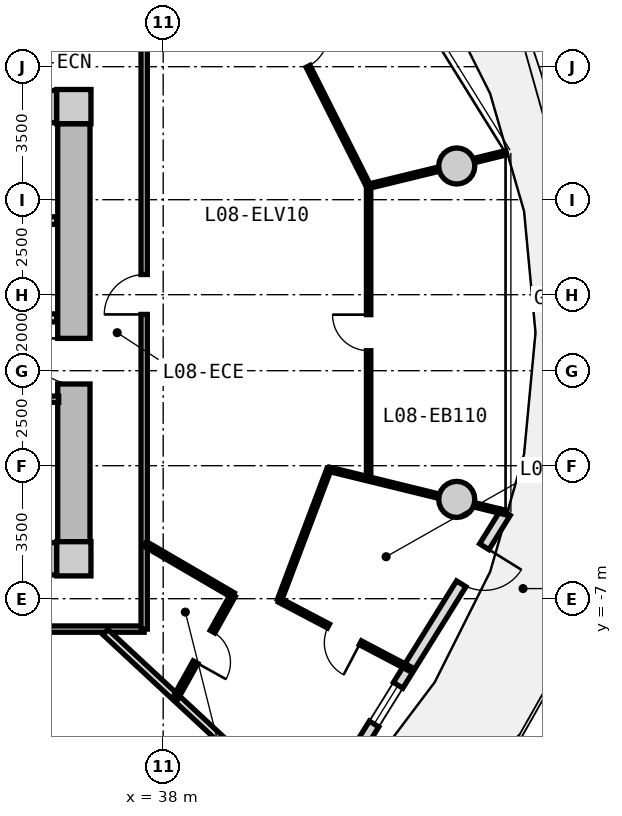
"""IFC4 building model, lengths in metres.
Left out: names, types, materials, properties, quantities, classifications, styles, units other than length and angle.
Written with IfcOpenShell. Run it as: python <this file> out.ifc"""

import sys

from ifc_helpers import new_model, si_unit, direction, frame, frame_2d, origin, origin_2d, place, context, subcontext, project, spatial, rectangle, circle, extrude, source, transform, mapped, element, fill, save


model = new_model("IFC4")
c1 = context("Model", 3, precision=1e-05, world=origin(), true_north=direction((0.0, 1.0)))
c2 = subcontext(c1, "Body", "Model", "MODEL_VIEW")
j1 = project(units=[si_unit("LENGTHUNIT", "METRE"), si_unit("PLANEANGLEUNIT", "RADIAN")], contexts=[c1])
p1 = place(None, origin())
s1 = spatial("IfcSite", under=j1, at=p1, CompositionType="ELEMENT")
p2 = place(p1, origin())
s2 = spatial("IfcBuilding", under=s1, at=p2, CompositionType="ELEMENT")
p3 = place(p2, frame((0.0, 0.0, 30.75)))
s3 = spatial("IfcBuildingStorey", under=s2, at=p3, CompositionType="ELEMENT", Elevation=30.75)
m1 = source(origin(), c2, "Body", "SweptSolid", [
    extrude(rectangle(XDim=0.9, YDim=0.9, at=origin_2d()), origin(), (0.0, 0.0, 1.0), 3.05),
])
for number, where, z_axis, x_axis in (
    (1, (35.65, -5.95, 0.0), (0.0, 0.0, 1.0), (1.0, 0.0, 0.0)),
    (2, (35.65, 5.95, 0.0), (0.0, 0.0, 1.0), (1.0, 0.0, 0.0)),
):
    element("IfcColumn", number, at=place(p3, frame(where, z_axis=z_axis, x_axis=x_axis)), inside=s3, PredefinedType="COLUMN", context=c2, shape_type="MappedRepresentation", body=[
        mapped(m1, transform((0.0, 0.0, 0.0), x_axis=(1.0, 0.0, 0.0), y_axis=(0.0, 1.0, 0.0), z_axis=(0.0, 0.0, 1.0), scale=1.0)),
    ])
m2 = source(origin(), c2, "Body", "SweptSolid", [
    extrude(rectangle(XDim=14.4, YDim=0.85, at=frame_2d((7.2, 0.0))), origin(), (0.0, 0.0, 1.0), 2.79),
])
for number, where, z_axis, x_axis in (
    (3, (20.8, 5.95, 0.0), (0.0, 0.0, 1.0), (1.0, 0.0, 0.0)),
    (4, (35.2, -5.95, 0.0), (0.0, 0.0, 1.0), (-1.0, 0.0, 0.0)),
):
    element("IfcWall", number, at=place(p3, frame(where, z_axis=z_axis, x_axis=x_axis)), inside=s3, PredefinedType="SHEAR", context=c2, shape_type="MappedRepresentation", body=[
        mapped(m2, transform((0.0, 0.0, 0.0), x_axis=(1.0, 0.0, 0.0), y_axis=(0.0, 1.0, 0.0), z_axis=(0.0, 0.0, 1.0), scale=1.0)),
    ])
m3 = source(origin(), c2, "Body", "SweptSolid", [
    extrude(rectangle(XDim=11.0, YDim=0.85, at=frame_2d((5.5, 0.0))), origin(), (0.0, 0.0, 1.0), 2.79),
])
p4 = place(p3, frame((35.65, 5.5, 0.0), z_axis=(0.0, 0.0, 1.0), x_axis=(0.0, -1.0, 0.0)))
e5 = element("IfcWall", 5, at=p4, inside=s3, PredefinedType="SHEAR", context=c2, shape_type="MappedRepresentation", body=[
    mapped(m3, transform((0.0, 0.0, 0.0), x_axis=(1.0, 0.0, 0.0), y_axis=(0.0, 1.0, 0.0), z_axis=(0.0, 0.0, 1.0), scale=1.0)),
])
p5 = place(p4, frame((5.65, 0.0, 0.0)))
e6 = element("IfcOpeningElement", 6, at=p5, cuts=e5, PredefinedType="OPENING", context=c2, shape_type="SweptSolid", body=[
    extrude(rectangle(XDim=1.2, YDim=2.15, at=frame_2d((0.6, 1.075))), frame((0.0, 0.435, 0.0), z_axis=(0.0, -1.0, 0.0), x_axis=(1.0, 0.0, 0.0)), (0.0, 0.0, 1.0), 0.87),
])
m4 = source(origin(), c2, "Body", "SweptSolid", [
    extrude(circle(Radius=0.475, at=origin_2d()), origin(), (0.0, 0.0, 1.0), 3.05),
])
for number, where, z_axis, x_axis in (
    (7, (45.725, 4.387, 0.0), (0.0, 0.0, 1.0), (1.0, 0.0, 0.0)),
    (8, (45.725, -4.387, 0.0), (0.0, 0.0, 1.0), (1.0, 0.0, 0.0)),
):
    element("IfcColumn", number, at=place(p3, frame(where, z_axis=z_axis, x_axis=x_axis)), inside=s3, PredefinedType="COLUMN", context=c2, shape_type="MappedRepresentation", body=[
        mapped(m4, transform((0.0, 0.0, 0.0), x_axis=(1.0, 0.0, 0.0), y_axis=(0.0, 1.0, 0.0), z_axis=(0.0, 0.0, 1.0), scale=1.0)),
    ])
m5 = source(origin(), c2, "Body", "SweptSolid", [
    extrude(rectangle(XDim=9.649, YDim=0.29, at=frame_2d((4.824, 0.0))), origin(), (0.0, 0.0, 1.0), 2.79),
])
p6 = place(p3, frame((47.01, -4.731, 0.0), z_axis=(0.0, 0.0, 1.0), x_axis=(-0.527909458386, -0.849300655684, 0.0)))
e9 = element("IfcWall", 9, at=p6, inside=s3, PredefinedType="SOLIDWALL", context=c2, shape_type="MappedRepresentation", body=[
    mapped(m5, transform((0.0, 0.0, 0.0), x_axis=(1.0, 0.0, 0.0), y_axis=(0.0, 1.0, 0.0), z_axis=(0.0, 0.0, 1.0), scale=1.0)),
])
p7 = place(p6, frame((1.06, 0.0, 0.0)))
e10 = element("IfcOpeningElement", 10, at=p7, cuts=e9, PredefinedType="OPENING", context=c2, shape_type="SweptSolid", body=[
    extrude(rectangle(XDim=1.15, YDim=2.25, at=frame_2d((0.575, 1.125))), frame((0.0, 0.155, 0.0), z_axis=(0.0, -1.0, 0.0), x_axis=(1.0, 0.0, 0.0)), (0.0, 0.0, 1.0), 0.31),
])
p8 = place(p6, frame((5.354, 0.0, 0.85)))
e11 = element("IfcOpeningElement", 11, at=p8, cuts=e9, PredefinedType="OPENING", context=c2, shape_type="SweptSolid", body=[
    extrude(rectangle(XDim=1.2, YDim=1.5, at=frame_2d((0.6, 0.75))), frame((0.0, 0.155, 0.0), z_axis=(0.0, -1.0, 0.0), x_axis=(1.0, 0.0, 0.0)), (0.0, 0.0, 1.0), 0.31),
])
m6 = source(origin(), c2, "Body", "SweptSolid", [
    extrude(rectangle(XDim=3.2, YDim=0.2, at=frame_2d((1.6, 0.0))), origin(), (0.0, 0.0, 1.0), 2.775),
])
p9 = place(p3, frame((32.0, 2.95, 0.0), z_axis=(0.0, 0.0, 1.0), x_axis=(1.0, 0.0, 0.0)))
e12 = element("IfcWall", 12, at=p9, inside=s3, PredefinedType="PARTITIONING", context=c2, shape_type="MappedRepresentation", body=[
    mapped(m6, transform((0.0, 0.0, 0.0), x_axis=(1.0, 0.0, 0.0), y_axis=(0.0, 1.0, 0.0), z_axis=(0.0, 0.0, 1.0), scale=1.0)),
])
m7 = source(origin(), c2, "Body", "SweptSolid", [
    extrude(rectangle(XDim=6.66, YDim=0.21, at=frame_2d((3.33, 0.0))), origin(), (0.0, 0.0, 1.0), 2.775),
])
p10 = place(p3, frame((28.54, 0.39, 0.0), z_axis=(0.0, 0.0, 1.0), x_axis=(1.0, 0.0, 0.0)))
e13 = element("IfcWall", 13, at=p10, inside=s3, PredefinedType="PARTITIONING", context=c2, shape_type="MappedRepresentation", body=[
    mapped(m7, transform((0.0, 0.0, 0.0), x_axis=(1.0, 0.0, 0.0), y_axis=(0.0, 1.0, 0.0), z_axis=(0.0, 0.0, 1.0), scale=1.0)),
])
p11 = place(p10, frame((1.0, 0.0, 0.0)))
e14 = element("IfcOpeningElement", 14, at=p11, cuts=e13, PredefinedType="OPENING", context=c2, shape_type="SweptSolid", body=[
    extrude(rectangle(XDim=1.2, YDim=2.15, at=frame_2d((0.6, 1.075))), frame((0.0, 0.115, 0.0), z_axis=(0.0, -1.0, 0.0), x_axis=(1.0, 0.0, 0.0)), (0.0, 0.0, 1.0), 0.23),
])
m8 = source(origin(), c2, "Body", "SweptSolid", [
    extrude(rectangle(XDim=2.7, YDim=0.165, at=frame_2d((1.35, 0.0))), origin(), (0.0, 0.0, 1.0), 2.775),
])
p12 = place(p3, frame((32.55, -1.75, 0.0), z_axis=(0.0, 0.0, 1.0), x_axis=(1.0, 0.0, 0.0)))
e15 = element("IfcWall", 15, at=p12, inside=s3, PredefinedType="PARTITIONING", context=c2, shape_type="MappedRepresentation", body=[
    mapped(m8, transform((0.0, 0.0, 0.0), x_axis=(1.0, 0.0, 0.0), y_axis=(0.0, 1.0, 0.0), z_axis=(0.0, 0.0, 1.0), scale=1.0)),
])
p13 = place(p12, frame((0.222, 0.0, 0.0)))
e16 = element("IfcOpeningElement", 16, at=p13, cuts=e15, PredefinedType="OPENING", context=c2, shape_type="SweptSolid", body=[
    extrude(rectangle(XDim=0.925, YDim=2.1, at=frame_2d((0.462, 1.05))), frame((0.0, 0.093, 0.0), z_axis=(0.0, -1.0, 0.0), x_axis=(1.0, 0.0, 0.0)), (0.0, 0.0, 1.0), 0.185),
])
p14 = place(p12, frame((1.522, 0.0, 0.0)))
e17 = element("IfcOpeningElement", 17, at=p14, cuts=e15, PredefinedType="OPENING", context=c2, shape_type="SweptSolid", body=[
    extrude(rectangle(XDim=0.925, YDim=2.1, at=frame_2d((0.462, 1.05))), frame((0.0, 0.093, 0.0), z_axis=(0.0, -1.0, 0.0), x_axis=(1.0, 0.0, 0.0)), (0.0, 0.0, 1.0), 0.185),
])
m9 = source(origin(), c2, "Body", "SweptSolid", [
    extrude(rectangle(XDim=19.0, YDim=0.165, at=frame_2d((9.5, 0.0))), origin(), (0.0, 0.0, 1.0), 2.775),
])
p15 = place(p3, frame((37.5, -7.8, 0.0), z_axis=(0.0, 0.0, 1.0), x_axis=(-1.0, 0.0, 0.0)))
e18 = element("IfcWall", 18, at=p15, inside=s3, PredefinedType="PARTITIONING", context=c2, shape_type="MappedRepresentation", body=[
    mapped(m9, transform((0.0, 0.0, 0.0), x_axis=(1.0, 0.0, 0.0), y_axis=(0.0, 1.0, 0.0), z_axis=(0.0, 0.0, 1.0), scale=1.0)),
])
p16 = place(p15, frame((7.336, 0.0, 0.0)))
e19 = element("IfcOpeningElement", 19, at=p16, cuts=e18, PredefinedType="OPENING", context=c2, shape_type="SweptSolid", body=[
    extrude(rectangle(XDim=1.05, YDim=2.15, at=frame_2d((0.525, 1.075))), frame((0.0, 0.093, 0.0), z_axis=(0.0, -1.0, 0.0), x_axis=(1.0, 0.0, 0.0)), (0.0, 0.0, 1.0), 0.185),
])
m10 = source(origin(), c2, "Body", "SweptSolid", [
    extrude(rectangle(XDim=15.6, YDim=0.165, at=frame_2d((7.8, 0.0))), origin(), (0.0, 0.0, 1.0), 2.775),
])
p17 = place(p3, frame((37.5, 7.8, 0.0), z_axis=(0.0, 0.0, 1.0), x_axis=(0.0, -1.0, 0.0)))
e20 = element("IfcWall", 20, at=p17, inside=s3, PredefinedType="PARTITIONING", context=c2, shape_type="MappedRepresentation", body=[
    mapped(m10, transform((0.0, 0.0, 0.0), x_axis=(1.0, 0.0, 0.0), y_axis=(0.0, 1.0, 0.0), z_axis=(0.0, 0.0, 1.0), scale=1.0)),
])
p18 = place(p17, frame((6.269, 0.0, 0.0)))
e21 = element("IfcOpeningElement", 21, at=p18, cuts=e20, PredefinedType="OPENING", context=c2, shape_type="SweptSolid", body=[
    extrude(rectangle(XDim=1.05, YDim=2.15, at=frame_2d((0.525, 1.075))), frame((0.0, 0.093, 0.0), z_axis=(0.0, -1.0, 0.0), x_axis=(1.0, 0.0, 0.0)), (0.0, 0.0, 1.0), 0.185),
])
m11 = source(origin(), c2, "Body", "SweptSolid", [
    extrude(rectangle(XDim=7.435, YDim=0.19, at=frame_2d((3.717, 0.0))), origin(), (0.0, 0.0, 1.0), 2.415),
])
p19 = place(p3, frame((36.483, -7.88, 0.0), z_axis=(0.0, 0.0, 1.0), x_axis=(0.732651956848, -0.680603489652, 0.0)))
e22 = element("IfcWall", 22, at=p19, inside=s3, PredefinedType="PARTITIONING", context=c2, shape_type="MappedRepresentation", body=[
    mapped(m11, transform((0.0, 0.0, 0.0), x_axis=(1.0, 0.0, 0.0), y_axis=(0.0, 1.0, 0.0), z_axis=(0.0, 0.0, 1.0), scale=1.0)),
])
m12 = source(origin(), c2, "Body", "SweptSolid", [
    extrude(rectangle(XDim=7.709, YDim=0.115, at=frame_2d((3.855, 0.0))), origin(), (0.0, 0.0, 1.0), 2.775),
])
p20 = place(p3, frame((43.406, -3.855, 0.0), z_axis=(0.0, 0.0, 1.0), x_axis=(0.0, 1.0, 0.0)))
e23 = element("IfcWall", 23, at=p20, inside=s3, PredefinedType="PARTITIONING", context=c2, shape_type="MappedRepresentation", body=[
    mapped(m12, transform((0.0, 0.0, 0.0), x_axis=(1.0, 0.0, 0.0), y_axis=(0.0, 1.0, 0.0), z_axis=(0.0, 0.0, 1.0), scale=1.0)),
])
p21 = place(p20, frame((3.38, 0.0, 0.0)))
e24 = element("IfcOpeningElement", 24, at=p21, cuts=e23, PredefinedType="OPENING", context=c2, shape_type="SweptSolid", body=[
    extrude(rectangle(XDim=0.95, YDim=2.1, at=frame_2d((0.475, 1.05))), frame((0.0, 0.067, 0.0), z_axis=(0.0, -1.0, 0.0), x_axis=(1.0, 0.0, 0.0)), (0.0, 0.0, 1.0), 0.135),
])
m13 = source(origin(), c2, "Body", "SweptSolid", [
    extrude(rectangle(XDim=4.803, YDim=0.115, at=frame_2d((2.401, 0.0))), origin(), (0.0, 0.0, 1.0), 2.225),
])
p22 = place(p3, frame((42.364, -3.594, 0.0), z_axis=(0.0, 0.0, 1.0), x_axis=(0.97129155908, -0.237892217736, 0.0)))
e25 = element("IfcWall", 25, at=p22, inside=s3, PredefinedType="PARTITIONING", context=c2, shape_type="MappedRepresentation", body=[
    mapped(m13, transform((0.0, 0.0, 0.0), x_axis=(1.0, 0.0, 0.0), y_axis=(0.0, 1.0, 0.0), z_axis=(0.0, 0.0, 1.0), scale=1.0)),
])
m14 = source(origin(), c2, "Body", "SweptSolid", [
    extrude(rectangle(XDim=8.018, YDim=0.115, at=frame_2d((4.009, 0.0))), origin(), (0.0, 0.0, 1.0), 2.775),
])
p23 = place(p3, frame((43.404, 3.854, 0.0), z_axis=(0.0, 0.0, 1.0), x_axis=(-0.450134355233, 0.89296084026, 0.0)))
e26 = element("IfcWall", 26, at=p23, inside=s3, PredefinedType="PARTITIONING", context=c2, shape_type="MappedRepresentation", body=[
    mapped(m14, transform((0.0, 0.0, 0.0), x_axis=(1.0, 0.0, 0.0), y_axis=(0.0, 1.0, 0.0), z_axis=(0.0, 0.0, 1.0), scale=1.0)),
])
p24 = place(p23, frame((3.534, 0.0, 0.0)))
e27 = element("IfcOpeningElement", 27, at=p24, cuts=e26, PredefinedType="OPENING", context=c2, shape_type="SweptSolid", body=[
    extrude(rectangle(XDim=0.95, YDim=2.1, at=frame_2d((0.475, 1.05))), frame((0.0, 0.067, 0.0), z_axis=(0.0, -1.0, 0.0), x_axis=(1.0, 0.0, 0.0)), (0.0, 0.0, 1.0), 0.135),
])
m15 = source(origin(), c2, "Body", "SweptSolid", [
    extrude(rectangle(XDim=3.73, YDim=0.115, at=frame_2d((1.865, 0.0))), origin(), (0.0, 0.0, 1.0), 2.225),
])
p25 = place(p3, frame((43.404, 3.854, 0.0), z_axis=(0.0, 0.0, 1.0), x_axis=(0.971644038568, 0.236448434791, 0.0)))
e28 = element("IfcWall", 28, at=p25, inside=s3, PredefinedType="PARTITIONING", context=c2, shape_type="MappedRepresentation", body=[
    mapped(m15, transform((0.0, 0.0, 0.0), x_axis=(1.0, 0.0, 0.0), y_axis=(0.0, 1.0, 0.0), z_axis=(0.0, 0.0, 1.0), scale=1.0)),
])
m16 = source(origin(), c2, "Body", "SweptSolid", [
    extrude(rectangle(XDim=2.669, YDim=0.14, at=frame_2d((1.335, 0.0))), origin(), (0.0, 0.0, 1.0), 2.775),
])
p26 = place(p3, frame((37.53, -5.561, 0.0), z_axis=(0.0, 0.0, 1.0), x_axis=(0.86369928178, -0.50400749067, 0.0)))
e29 = element("IfcWall", 29, at=p26, inside=s3, PredefinedType="PARTITIONING", context=c2, shape_type="MappedRepresentation", body=[
    mapped(m16, transform((0.0, 0.0, 0.0), x_axis=(1.0, 0.0, 0.0), y_axis=(0.0, 1.0, 0.0), z_axis=(0.0, 0.0, 1.0), scale=1.0)),
])
m17 = source(origin(), c2, "Body", "SweptSolid", [
    extrude(rectangle(XDim=3.121, YDim=0.14, at=frame_2d((1.561, 0.0))), origin(), (0.0, 0.0, 1.0), 2.775),
])
p27 = place(p3, frame((39.836, -6.906, 0.0), z_axis=(0.0, 0.0, 1.0), x_axis=(-0.487302357327, -0.873233309342, 0.0)))
e30 = element("IfcWall", 30, at=p27, inside=s3, PredefinedType="PARTITIONING", context=c2, shape_type="MappedRepresentation", body=[
    mapped(m17, transform((0.0, 0.0, 0.0), x_axis=(1.0, 0.0, 0.0), y_axis=(0.0, 1.0, 0.0), z_axis=(0.0, 0.0, 1.0), scale=1.0)),
])
p28 = place(p27, frame((1.101, 0.0, 0.0)))
e31 = element("IfcOpeningElement", 31, at=p28, cuts=e30, PredefinedType="OPENING", context=c2, shape_type="SweptSolid", body=[
    extrude(rectangle(XDim=0.92, YDim=2.1, at=frame_2d((0.46, 1.05))), frame((0.0, 0.08, 0.0), z_axis=(0.0, -1.0, 0.0), x_axis=(1.0, 0.0, 0.0)), (0.0, 0.0, 1.0), 0.16),
])
m18 = source(origin(), c2, "Body", "SweptSolid", [
    extrude(rectangle(XDim=3.864, YDim=0.115, at=frame_2d((1.932, 0.0))), origin(), (0.0, 0.0, 1.0), 2.775),
])
p29 = place(p3, frame((41.06, -7.041, 0.0), z_axis=(0.0, 0.0, 1.0), x_axis=(0.885194959803, -0.465220252289, 0.0)))
e32 = element("IfcWall", 32, at=p29, inside=s3, PredefinedType="PARTITIONING", context=c2, shape_type="MappedRepresentation", body=[
    mapped(m18, transform((0.0, 0.0, 0.0), x_axis=(1.0, 0.0, 0.0), y_axis=(0.0, 1.0, 0.0), z_axis=(0.0, 0.0, 1.0), scale=1.0)),
])
p30 = place(p29, frame((1.457, 0.0, 0.0)))
e33 = element("IfcOpeningElement", 33, at=p30, cuts=e32, PredefinedType="OPENING", context=c2, shape_type="SweptSolid", body=[
    extrude(rectangle(XDim=0.95, YDim=2.1, at=frame_2d((0.475, 1.05))), frame((0.0, 0.067, 0.0), z_axis=(0.0, -1.0, 0.0), x_axis=(1.0, 0.0, 0.0)), (0.0, 0.0, 1.0), 0.135),
])
m19 = source(origin(), c2, "Body", "SweptSolid", [
    extrude(rectangle(XDim=3.685, YDim=0.115, at=frame_2d((1.843, 0.0))), origin(), (0.0, 0.0, 1.0), 2.775),
])
p31 = place(p3, frame((41.06, -7.041, 0.0), z_axis=(0.0, 0.0, 1.0), x_axis=(0.353503632997, 0.935433151785, 0.0)))
e34 = element("IfcWall", 34, at=p31, inside=s3, PredefinedType="PARTITIONING", context=c2, shape_type="MappedRepresentation", body=[
    mapped(m19, transform((0.0, 0.0, 0.0), x_axis=(1.0, 0.0, 0.0), y_axis=(0.0, 1.0, 0.0), z_axis=(0.0, 0.0, 1.0), scale=1.0)),
])
m20 = source(origin(), c2, "Body", "SweptSolid", [
    extrude(rectangle(XDim=1.15, YDim=2.25, at=frame_2d((0.575, 1.125))), frame((0.0, 0.025, 0.0), z_axis=(0.0, -1.0, 0.0), x_axis=(1.0, 0.0, 0.0)), (0.0, 0.0, 1.0), 0.05),
])
p32 = place(p7, origin())
e35 = element("IfcDoor", 35, at=p32, inside=s3, OperationType="SINGLE_SWING_LEFT", PredefinedType="DOOR", context=c2, shape_type="MappedRepresentation", body=[
    mapped(m20, transform((0.0, 0.0, 0.0), x_axis=(1.0, 0.0, 0.0), y_axis=(0.0, 1.0, 0.0), z_axis=(0.0, 0.0, 1.0), scale=1.0)),
])
fill(e10, e35)
m21 = source(origin(), c2, "Body", "SweptSolid", [
    extrude(rectangle(XDim=1.2, YDim=1.5, at=frame_2d((0.6, 0.75))), frame((0.0, 0.03, 0.0), z_axis=(0.0, -1.0, 0.0), x_axis=(1.0, 0.0, 0.0)), (0.0, 0.0, 1.0), 0.06),
])
p33 = place(p8, origin())
e36 = element("IfcWindow", 36, at=p33, inside=s3, PartitioningType="SINGLE_PANEL", PredefinedType="WINDOW", context=c2, shape_type="MappedRepresentation", body=[
    mapped(m21, transform((0.0, 0.0, 0.0), x_axis=(1.0, 0.0, 0.0), y_axis=(0.0, 1.0, 0.0), z_axis=(0.0, 0.0, 1.0), scale=1.0)),
])
fill(e11, e36)
m22 = source(origin(), c2, "Body", "SweptSolid", [
    extrude(rectangle(XDim=1.2, YDim=2.15, at=frame_2d((0.6, 1.075))), frame((0.0, 0.025, 0.0), z_axis=(0.0, -1.0, 0.0), x_axis=(1.0, 0.0, 0.0)), (0.0, 0.0, 1.0), 0.05),
])
p34 = place(p5, frame((1.2, 0.0, 0.0), z_axis=(0.0, 0.0, 1.0), x_axis=(-1.0, 0.0, 0.0)))
e37 = element("IfcDoor", 37, at=p34, inside=s3, OperationType="SINGLE_SWING_RIGHT", PredefinedType="DOOR", context=c2, shape_type="MappedRepresentation", body=[
    mapped(m22, transform((0.0, 0.0, 0.0), x_axis=(1.0, 0.0, 0.0), y_axis=(0.0, 1.0, 0.0), z_axis=(0.0, 0.0, 1.0), scale=1.0)),
])
fill(e6, e37)
m23 = source(origin(), c2, "Body", "SweptSolid", [
    extrude(rectangle(XDim=1.05, YDim=2.15, at=frame_2d((0.525, 1.075))), frame((0.0, 0.025, 0.0), z_axis=(0.0, -1.0, 0.0), x_axis=(1.0, 0.0, 0.0)), (0.0, 0.0, 1.0), 0.05),
])
p35 = place(p18, frame((1.05, 0.0, 0.0), z_axis=(0.0, 0.0, 1.0), x_axis=(-1.0, 0.0, 0.0)))
e38 = element("IfcDoor", 38, at=p35, inside=s3, OperationType="SINGLE_SWING_LEFT", PredefinedType="DOOR", context=c2, shape_type="MappedRepresentation", body=[
    mapped(m23, transform((0.0, 0.0, 0.0), x_axis=(1.0, 0.0, 0.0), y_axis=(0.0, 1.0, 0.0), z_axis=(0.0, 0.0, 1.0), scale=1.0)),
])
fill(e21, e38)
m24 = source(origin(), c2, "Body", "SweptSolid", [
    extrude(rectangle(XDim=0.92, YDim=2.1, at=frame_2d((0.46, 1.05))), frame((0.0, 0.025, 0.0), z_axis=(0.0, -1.0, 0.0), x_axis=(1.0, 0.0, 0.0)), (0.0, 0.0, 1.0), 0.05),
])
p36 = place(p28, origin())
e39 = element("IfcDoor", 39, at=p36, inside=s3, OperationType="SINGLE_SWING_RIGHT", PredefinedType="DOOR", context=c2, shape_type="MappedRepresentation", body=[
    mapped(m24, transform((0.0, 0.0, 0.0), x_axis=(1.0, 0.0, 0.0), y_axis=(0.0, 1.0, 0.0), z_axis=(0.0, 0.0, 1.0), scale=1.0)),
])
fill(e31, e39)
m25 = source(origin(), c2, "Body", "SweptSolid", [
    extrude(rectangle(XDim=0.95, YDim=2.1, at=frame_2d((0.475, 1.05))), frame((0.0, 0.025, 0.0), z_axis=(0.0, -1.0, 0.0), x_axis=(1.0, 0.0, 0.0)), (0.0, 0.0, 1.0), 0.05),
])
p37 = place(p30, frame((0.95, 0.0, 0.0), z_axis=(0.0, 0.0, 1.0), x_axis=(-1.0, 0.0, 0.0)))
e40 = element("IfcDoor", 40, at=p37, inside=s3, OperationType="SINGLE_SWING_LEFT", PredefinedType="DOOR", context=c2, shape_type="MappedRepresentation", body=[
    mapped(m25, transform((0.0, 0.0, 0.0), x_axis=(1.0, 0.0, 0.0), y_axis=(0.0, 1.0, 0.0), z_axis=(0.0, 0.0, 1.0), scale=1.0)),
])
fill(e33, e40)
p38 = place(p21, origin())
e41 = element("IfcDoor", 41, at=p38, inside=s3, OperationType="SINGLE_SWING_RIGHT", PredefinedType="DOOR", context=c2, shape_type="MappedRepresentation", body=[
    mapped(m25, transform((0.0, 0.0, 0.0), x_axis=(1.0, 0.0, 0.0), y_axis=(0.0, 1.0, 0.0), z_axis=(0.0, 0.0, 1.0), scale=1.0)),
])
fill(e24, e41)
p39 = place(p24, frame((0.95, 0.0, 0.0), z_axis=(0.0, 0.0, 1.0), x_axis=(-1.0, 0.0, 0.0)))
e42 = element("IfcDoor", 42, at=p39, inside=s3, OperationType="SINGLE_SWING_LEFT", PredefinedType="DOOR", context=c2, shape_type="MappedRepresentation", body=[
    mapped(m25, transform((0.0, 0.0, 0.0), x_axis=(1.0, 0.0, 0.0), y_axis=(0.0, 1.0, 0.0), z_axis=(0.0, 0.0, 1.0), scale=1.0)),
])
fill(e27, e42)
save(model, sys.argv[1])
